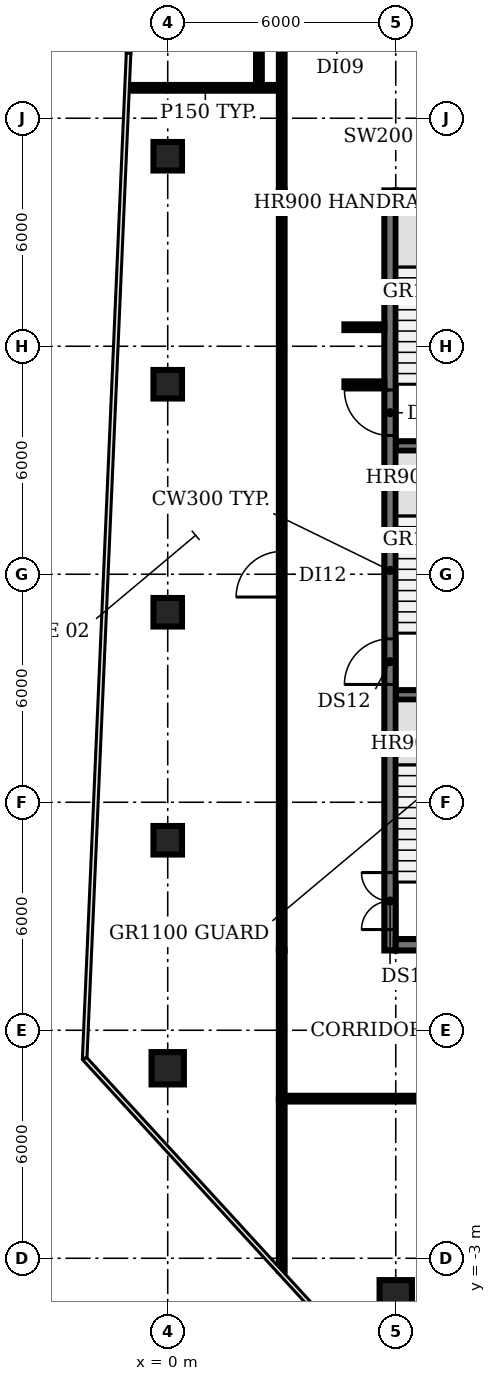
"""IFC4 building model, lengths in metres.
Left out: names, types, materials, properties, quantities, classifications, styles, units other than length and angle.
Written with IfcOpenShell. Run it as: python <this file> out.ifc"""

import sys

from ifc_helpers import new_model, si_unit, direction, frame, frame_2d, origin, origin_2d, place, context, subcontext, project, spatial, rectangle, circle, extrude, element, fill, save


model = new_model("IFC4")
c1 = context("Model", 3, precision=1e-05, world=origin(), true_north=direction((0.0, 1.0)))
c2 = subcontext(c1, "Body", "Model", "MODEL_VIEW")
j1 = project(units=[si_unit("LENGTHUNIT", "METRE"), si_unit("PLANEANGLEUNIT", "RADIAN")], contexts=[c1])
p1 = place(None, origin())
s1 = spatial("IfcSite", under=j1, at=p1, CompositionType="ELEMENT")
p2 = place(p1, origin())
s2 = spatial("IfcBuilding", under=s1, at=p2, CompositionType="ELEMENT")
p3 = place(p2, frame((0.0, 0.0, 276.8)))
s3 = spatial("IfcBuildingStorey", under=s2, at=p3, CompositionType="ELEMENT", Elevation=276.8)
p4 = place(p3, frame((0.0, 2.0, 0.0), z_axis=(0.0, 0.0, 1.0), x_axis=(1.0, 0.0, 0.0)))
e1 = element("IfcColumn", 1, at=p4, inside=s3, PredefinedType="COLUMN", context=c2, shape_type="SweptSolid", body=[
    extrude(circle(Radius=0.425, at=origin_2d()), origin(), (0.0, 0.0, 1.0), 3.85),
])
for number, where, z_axis, x_axis in (
    (2, (0.0, 8.0, 0.0), (0.0, 0.0, 1.0), (1.0, 0.0, 0.0)),
    (3, (0.0, 14.0, 0.0), (0.0, 0.0, 1.0), (1.0, 0.0, 0.0)),
    (4, (0.0, 20.0, 0.0), (0.0, 0.0, 1.0), (1.0, 0.0, 0.0)),
    (5, (0.0, 26.0, 0.0), (0.0, 0.0, 1.0), (1.0, 0.0, 0.0)),
):
    element("IfcColumn", number, at=place(p3, frame(where, z_axis=z_axis, x_axis=x_axis)), inside=s3, PredefinedType="COLUMN", context=c2, shape_type="SweptSolid", body=[
        extrude(rectangle(XDim=0.75, YDim=0.75, at=origin_2d()), origin(), (0.0, 0.0, 1.0), 3.85),
    ])
p5 = place(p3, frame((6.0, -4.0, 0.0), z_axis=(0.0, 0.0, 1.0), x_axis=(1.0, 0.0, 0.0)))
e6 = element("IfcColumn", 6, at=p5, inside=s3, PredefinedType="COLUMN", context=c2, shape_type="SweptSolid", body=[
    extrude(circle(Radius=0.425, at=origin_2d()), origin(), (0.0, 0.0, 1.0), 3.85),
])
for number, where, z_axis, x_axis in (
    (7, (6.0, 11.825, 0.0), (0.0, 0.0, 1.0), (1.0, 0.0, 0.0)),
    (8, (6.0, 18.375, 0.0), (0.0, 0.0, 1.0), (1.0, 0.0, 0.0)),
):
    element("IfcWall", number, at=place(p3, frame(where, z_axis=z_axis, x_axis=x_axis)), inside=s3, PredefinedType="SHEAR", context=c2, shape_type="SweptSolid", body=[
        extrude(rectangle(XDim=3.15, YDim=0.25, at=frame_2d((1.575, 0.0))), origin(), (0.0, 0.0, 1.0), 3.85),
    ])
p6 = place(p3, frame((5.85, 5.1, 0.0), z_axis=(0.0, 0.0, 1.0), x_axis=(0.0, 1.0, 0.0)))
e9 = element("IfcWall", 9, at=p6, inside=s3, PredefinedType="SHEAR", context=c2, shape_type="SweptSolid", body=[
    extrude(rectangle(XDim=20.0, YDim=0.3, at=frame_2d((10.0, 0.0))), origin(), (0.0, 0.0, 1.0), 3.85),
])
p7 = place(p6, frame((0.55, 0.0, 0.0)))
e10 = element("IfcOpeningElement", 10, at=p7, cuts=e9, PredefinedType="OPENING", context=c2, shape_type="SweptSolid", body=[
    extrude(rectangle(XDim=1.5, YDim=2.1, at=frame_2d((0.75, 1.05))), frame((0.0, 0.16, 0.0), z_axis=(0.0, -1.0, 0.0), x_axis=(1.0, 0.0, 0.0)), (0.0, 0.0, 1.0), 0.32),
])
p8 = place(p6, frame((7.0, 0.0, 0.0)))
e11 = element("IfcOpeningElement", 11, at=p8, cuts=e9, PredefinedType="OPENING", context=c2, shape_type="SweptSolid", body=[
    extrude(rectangle(XDim=1.2, YDim=2.1, at=frame_2d((0.6, 1.05))), frame((0.0, 0.16, 0.0), z_axis=(0.0, -1.0, 0.0), x_axis=(1.0, 0.0, 0.0)), (0.0, 0.0, 1.0), 0.32),
])
p9 = place(p6, frame((13.55, 0.0, 0.0)))
e12 = element("IfcOpeningElement", 12, at=p9, cuts=e9, PredefinedType="OPENING", context=c2, shape_type="SweptSolid", body=[
    extrude(rectangle(XDim=1.2, YDim=2.1, at=frame_2d((0.6, 1.05))), frame((0.0, 0.16, 0.0), z_axis=(0.0, -1.0, 0.0), x_axis=(1.0, 0.0, 0.0)), (0.0, 0.0, 1.0), 0.32),
])
p10 = place(p3, frame((24.0, 5.25, 0.0), z_axis=(0.0, 0.0, 1.0), x_axis=(-1.0, 0.0, 0.0)))
e13 = element("IfcWall", 13, at=p10, inside=s3, PredefinedType="SHEAR", context=c2, shape_type="SweptSolid", body=[
    extrude(rectangle(XDim=18.0, YDim=0.3, at=frame_2d((9.0, 0.0))), origin(), (0.0, 0.0, 1.0), 3.85),
])
p11 = place(p10, frame((13.0, 0.0, 0.0)))
e14 = element("IfcOpeningElement", 14, at=p11, cuts=e13, PredefinedType="OPENING", context=c2, shape_type="SweptSolid", body=[
    extrude(rectangle(XDim=1.2, YDim=2.1, at=frame_2d((0.6, 1.05))), frame((0.0, 0.16, 0.0), z_axis=(0.0, -1.0, 0.0), x_axis=(1.0, 0.0, 0.0)), (0.0, 0.0, 1.0), 0.32),
])
p12 = place(p10, frame((4.9, 0.0, 0.0)))
e15 = element("IfcOpeningElement", 15, at=p12, cuts=e13, PredefinedType="OPENING", context=c2, shape_type="SweptSolid", body=[
    extrude(rectangle(XDim=1.0, YDim=2.1, at=frame_2d((0.5, 1.05))), frame((0.0, 0.16, 0.0), z_axis=(0.0, -1.0, 0.0), x_axis=(1.0, 0.0, 0.0)), (0.0, 0.0, 1.0), 0.32),
])
p13 = place(p3, frame((6.0, 24.95, 0.0), z_axis=(0.0, 0.0, 1.0), x_axis=(1.0, 0.0, 0.0)))
e16 = element("IfcWall", 16, at=p13, inside=s3, PredefinedType="SHEAR", context=c2, shape_type="SweptSolid", body=[
    extrude(rectangle(XDim=18.0, YDim=0.3, at=frame_2d((9.0, 0.0))), origin(), (0.0, 0.0, 1.0), 3.85),
])
p14 = place(p3, frame((-1.02, 27.8, 0.0), z_axis=(0.0, 0.0, 1.0), x_axis=(1.0, 0.0, 0.0)))
e17 = element("IfcWall", 17, at=p14, inside=s3, PredefinedType="PARTITIONING", context=c2, shape_type="SweptSolid", body=[
    extrude(rectangle(XDim=4.02, YDim=0.15, at=frame_2d((2.01, 0.0))), origin(), (0.0, 0.0, 1.0), 2.9),
])
p15 = place(p3, frame((2.4, 27.8, 0.0), z_axis=(0.0, 0.0, 1.0), x_axis=(0.0, 1.0, 0.0)))
e18 = element("IfcWall", 18, at=p15, inside=s3, PredefinedType="PARTITIONING", context=c2, shape_type="SweptSolid", body=[
    extrude(rectangle(XDim=6.0, YDim=0.15, at=frame_2d((3.0, 0.0))), origin(), (0.0, 0.0, 1.0), 2.9),
])
p16 = place(p3, frame((3.0, -3.33, 0.0), z_axis=(0.0, 0.0, 1.0), x_axis=(0.0, 1.0, 0.0)))
e19 = element("IfcWall", 19, at=p16, inside=s3, PredefinedType="PARTITIONING", context=c2, shape_type="SweptSolid", body=[
    extrude(rectangle(XDim=4.53, YDim=0.15, at=frame_2d((2.265, 0.0))), origin(), (0.0, 0.0, 1.0), 2.9),
])
p17 = place(p3, frame((3.0, 1.2, 0.0), z_axis=(0.0, 0.0, 1.0), x_axis=(0.0, 1.0, 0.0)))
e20 = element("IfcWall", 20, at=p17, inside=s3, PredefinedType="PARTITIONING", context=c2, shape_type="SweptSolid", body=[
    extrude(rectangle(XDim=3.9, YDim=0.15, at=frame_2d((1.95, 0.0))), origin(), (0.0, 0.0, 1.0), 2.9),
])
p18 = place(p3, frame((3.0, 5.1, 0.0), z_axis=(0.0, 0.0, 1.0), x_axis=(0.0, 1.0, 0.0)))
e21 = element("IfcWall", 21, at=p18, inside=s3, PredefinedType="PARTITIONING", context=c2, shape_type="SweptSolid", body=[
    extrude(rectangle(XDim=20.0, YDim=0.15, at=frame_2d((10.0, 0.0))), origin(), (0.0, 0.0, 1.0), 2.9),
])
p19 = place(p18, frame((9.3, 0.0, 0.0)))
e22 = element("IfcOpeningElement", 22, at=p19, cuts=e21, PredefinedType="OPENING", context=c2, shape_type="SweptSolid", body=[
    extrude(rectangle(XDim=1.2, YDim=2.1, at=frame_2d((0.6, 1.05))), frame((0.0, 0.085, 0.0), z_axis=(0.0, -1.0, 0.0), x_axis=(1.0, 0.0, 0.0)), (0.0, 0.0, 1.0), 0.17),
])
p20 = place(p3, frame((3.0, 25.1, 0.0), z_axis=(0.0, 0.0, 1.0), x_axis=(0.0, 1.0, 0.0)))
e23 = element("IfcWall", 23, at=p20, inside=s3, PredefinedType="PARTITIONING", context=c2, shape_type="SweptSolid", body=[
    extrude(rectangle(XDim=3.9, YDim=0.15, at=frame_2d((1.95, 0.0))), origin(), (0.0, 0.0, 1.0), 2.9),
])
for number, where, z_axis, x_axis in (
    (24, (4.65, 20.0, 0.0), (0.0, 0.0, 1.0), (1.0, 0.0, 0.0)),
    (25, (4.65, 21.5, 0.0), (0.0, 0.0, 1.0), (1.0, 0.0, 0.0)),
):
    element("IfcWall", number, at=place(p3, frame(where, z_axis=z_axis, x_axis=x_axis)), inside=s3, PredefinedType="PARTITIONING", context=c2, shape_type="SweptSolid", body=[
        extrude(rectangle(XDim=1.05, YDim=0.15, at=frame_2d((0.525, 0.0))), origin(), (0.0, 0.0, 1.0), 2.9),
    ])
p21 = place(p3, frame((27.0, 1.2, 0.0), z_axis=(0.0, 0.0, 1.0), x_axis=(-1.0, 0.0, 0.0)))
e26 = element("IfcWall", 26, at=p21, inside=s3, PredefinedType="PARTITIONING", context=c2, shape_type="SweptSolid", body=[
    extrude(rectangle(XDim=24.0, YDim=0.15, at=frame_2d((12.0, 0.0))), origin(), (0.0, 0.0, 1.0), 2.9),
])
p22 = place(p21, frame((11.5, 0.0, 0.0)))
e27 = element("IfcOpeningElement", 27, at=p22, cuts=e26, PredefinedType="OPENING", context=c2, shape_type="SweptSolid", body=[
    extrude(rectangle(XDim=1.2, YDim=2.1, at=frame_2d((0.6, 1.05))), frame((0.0, 0.085, 0.0), z_axis=(0.0, -1.0, 0.0), x_axis=(1.0, 0.0, 0.0)), (0.0, 0.0, 1.0), 0.17),
])
p23 = place(p7, origin())
e28 = element("IfcDoor", 28, at=p23, inside=s3, OperationType="DOUBLE_DOOR_SINGLE_SWING", PredefinedType="DOOR", context=c2, shape_type="SweptSolid", body=[
    extrude(rectangle(XDim=1.5, YDim=2.1, at=frame_2d((0.75, 1.05))), frame((0.0, 0.025, 0.0), z_axis=(0.0, -1.0, 0.0), x_axis=(1.0, 0.0, 0.0)), (0.0, 0.0, 1.0), 0.05),
])
fill(e10, e28)
p24 = place(p8, origin())
e29 = element("IfcDoor", 29, at=p24, inside=s3, OperationType="SINGLE_SWING_LEFT", PredefinedType="DOOR", context=c2, shape_type="SweptSolid", body=[
    extrude(rectangle(XDim=1.2, YDim=2.1, at=frame_2d((0.6, 1.05))), frame((0.0, 0.025, 0.0), z_axis=(0.0, -1.0, 0.0), x_axis=(1.0, 0.0, 0.0)), (0.0, 0.0, 1.0), 0.05),
])
fill(e11, e29)
p25 = place(p9, origin())
e30 = element("IfcDoor", 30, at=p25, inside=s3, OperationType="SINGLE_SWING_RIGHT", PredefinedType="DOOR", context=c2, shape_type="SweptSolid", body=[
    extrude(rectangle(XDim=1.2, YDim=2.1, at=frame_2d((0.6, 1.05))), frame((0.0, 0.025, 0.0), z_axis=(0.0, -1.0, 0.0), x_axis=(1.0, 0.0, 0.0)), (0.0, 0.0, 1.0), 0.05),
])
fill(e12, e30)
p26 = place(p19, origin())
e31 = element("IfcDoor", 31, at=p26, inside=s3, OperationType="SINGLE_SWING_LEFT", PredefinedType="DOOR", context=c2, shape_type="SweptSolid", body=[
    extrude(rectangle(XDim=1.2, YDim=2.1, at=frame_2d((0.6, 1.05))), frame((0.0, 0.025, 0.0), z_axis=(0.0, -1.0, 0.0), x_axis=(1.0, 0.0, 0.0)), (0.0, 0.0, 1.0), 0.05),
])
fill(e22, e31)
save(model, sys.argv[1])
